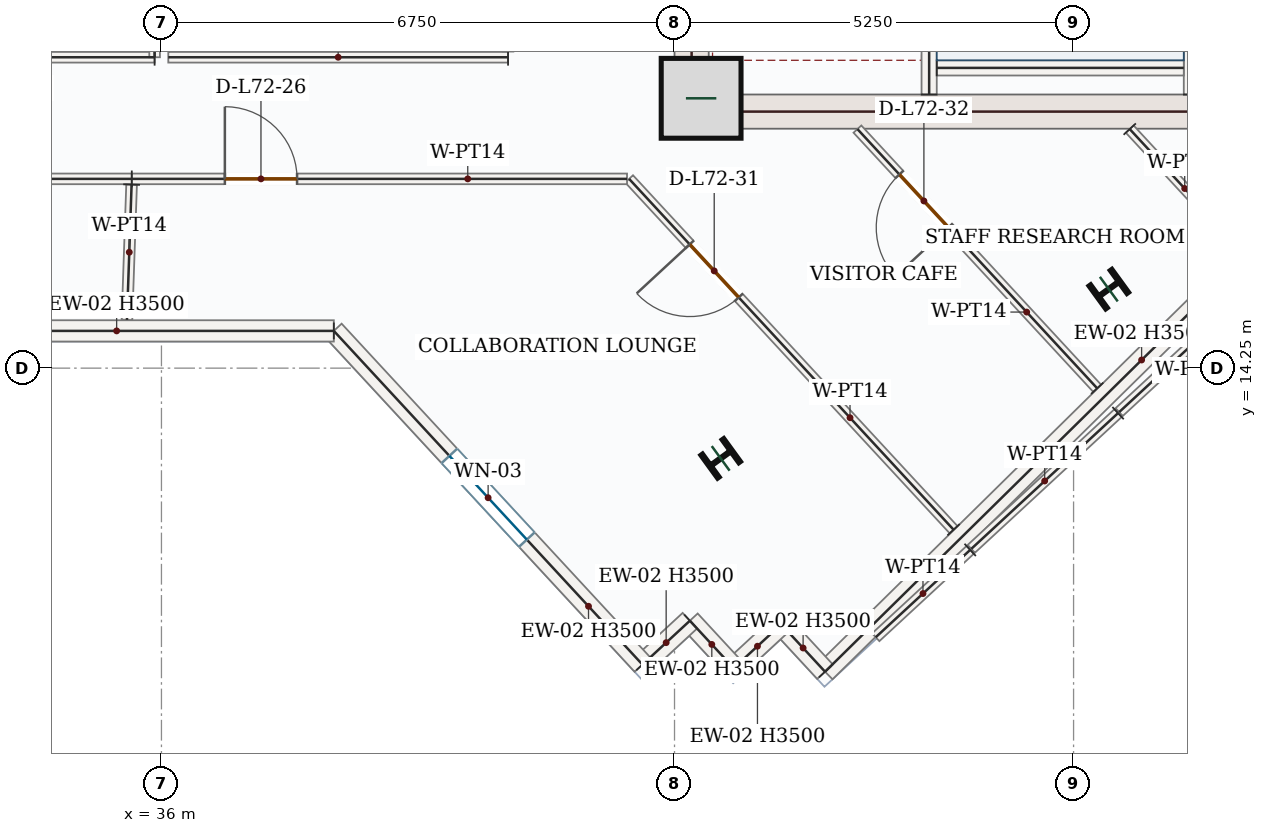
"""IFC4 building model, lengths in metres.
Left out: names, types, materials, properties, quantities, classifications, styles, units other than length and angle.
Written with IfcOpenShell. Run it as: python <this file> out.ifc"""

import sys

from ifc_helpers import new_model, si_unit, direction, frame, frame_2d, origin, origin_2d, place, context, subcontext, project, spatial, rectangle, i_section, extrude, source, transform, mapped, element, fill, save


model = new_model("IFC4")
c1 = context("Model", 3, precision=1e-05, world=origin(), true_north=direction((0.0, 1.0)))
c2 = subcontext(c1, "Body", "Model", "MODEL_VIEW")
j1 = project(units=[si_unit("LENGTHUNIT", "METRE"), si_unit("PLANEANGLEUNIT", "RADIAN")], contexts=[c1])
p1 = place(None, origin())
s1 = spatial("IfcSite", under=j1, at=p1, CompositionType="ELEMENT")
p2 = place(p1, origin())
s2 = spatial("IfcBuilding", under=s1, at=p2, CompositionType="ELEMENT")
p3 = place(p2, frame((0.0, 0.0, 299.1)))
s3 = spatial("IfcBuildingStorey", under=s2, at=p3, CompositionType="ELEMENT", Elevation=299.1)
p4 = place(p3, frame((42.975, 17.4, 0.0), z_axis=(0.0, 0.0, 1.0), x_axis=(0.0, 1.0, 0.0)))
e1 = element("IfcWall", 1, at=p4, inside=s3, PredefinedType="SHEAR", context=c2, shape_type="SweptSolid", body=[
    extrude(rectangle(XDim=8.55, YDim=0.45, at=frame_2d((4.275, 0.0))), origin(), (0.0, 0.0, 1.0), 3.5),
])
p5 = place(p4, frame((6.65, 0.0, 0.0)))
e2 = element("IfcOpeningElement", 2, at=p5, cuts=e1, PredefinedType="OPENING", context=c2, shape_type="SweptSolid", body=[
    extrude(rectangle(XDim=1.1, YDim=2.2, at=frame_2d((0.55, 1.1))), frame((0.0, 0.235, 0.0), z_axis=(0.0, -1.0, 0.0), x_axis=(1.0, 0.0, 0.0)), (0.0, 0.0, 1.0), 0.47),
])
p6 = place(p4, frame((1.75, 0.0, 0.0)))
e3 = element("IfcOpeningElement", 3, at=p6, cuts=e1, PredefinedType="OPENING", context=c2, shape_type="SweptSolid", body=[
    extrude(rectangle(XDim=1.3, YDim=2.2, at=frame_2d((0.65, 1.1))), frame((0.0, 0.235, 0.0), z_axis=(0.0, -1.0, 0.0), x_axis=(1.0, 0.0, 0.0)), (0.0, 0.0, 1.0), 0.47),
])
p7 = place(p4, frame((4.55, 0.0, 0.0)))
e4 = element("IfcOpeningElement", 4, at=p7, cuts=e1, PredefinedType="OPENING", context=c2, shape_type="SweptSolid", body=[
    extrude(rectangle(XDim=0.88, YDim=2.1, at=frame_2d((0.44, 1.05))), frame((0.0, 0.235, 0.0), z_axis=(0.0, -1.0, 0.0), x_axis=(1.0, 0.0, 0.0)), (0.0, 0.0, 1.0), 0.47),
])
m1 = source(origin(), c2, "Body", "SweptSolid", [
    extrude(rectangle(XDim=7.1, YDim=0.45, at=frame_2d((3.55, 0.0))), origin(), (0.0, 0.0, 1.0), 3.5),
])
p8 = place(p3, frame((43.2, 17.625, 0.0), z_axis=(0.0, 0.0, 1.0), x_axis=(1.0, 0.0, 0.0)))
e5 = element("IfcWall", 5, at=p8, inside=s3, PredefinedType="SHEAR", context=c2, shape_type="MappedRepresentation", body=[
    mapped(m1, transform((0.0, 0.0, 0.0), x_axis=(1.0, 0.0, 0.0), y_axis=(0.0, 1.0, 0.0), z_axis=(0.0, 0.0, 1.0), scale=1.0)),
])
m2 = source(origin(), c2, "Body", "SweptSolid", [
    extrude(rectangle(XDim=1.05, YDim=1.05, at=origin_2d()), origin(), (0.0, 0.0, 1.0), 3.75),
])
p9 = place(p3, frame((43.1, 17.8, 0.0), z_axis=(0.0, 0.0, 1.0), x_axis=(1.0, 0.0, 0.0)))
e6 = element("IfcColumn", 6, at=p9, inside=s3, PredefinedType="COLUMN", context=c2, shape_type="MappedRepresentation", body=[
    mapped(m2, transform((0.0, 0.0, 0.0), x_axis=(1.0, 0.0, 0.0), y_axis=(0.0, 1.0, 0.0), z_axis=(0.0, 0.0, 1.0), scale=1.0)),
])
m3 = source(origin(), c2, "Body", "SweptSolid", [
    extrude(i_section(OverallWidth=0.374, OverallDepth=0.372, WebThickness=0.016, FlangeThickness=0.026, FilletRadius=0.018, at=origin_2d()), origin(), (0.0, 0.0, 1.0), 3.75),
])
for number, where, z_axis, x_axis in (
    (7, (43.357, 13.063, 0.0), (0.0, 0.0, 1.0), (-0.588, 0.809, 0.0)),
    (8, (48.464, 15.289, 0.0), (0.0, 0.0, 1.0), (-0.588, 0.809, 0.0)),
):
    element("IfcColumn", number, at=place(p3, frame(where, z_axis=z_axis, x_axis=x_axis)), inside=s3, PredefinedType="COLUMN", context=c2, shape_type="MappedRepresentation", body=[
        mapped(m3, transform((0.0, 0.0, 0.0), x_axis=(1.0, 0.0, 0.0), y_axis=(0.0, 1.0, 0.0), z_axis=(0.0, 0.0, 1.0), scale=1.0)),
    ])
m4 = source(origin(), c2, "Body", "SweptSolid", [
    extrude(rectangle(XDim=11.69, YDim=0.28, at=frame_2d((5.845, 0.0))), origin(), (0.0, 0.0, 1.0), 3.5),
])
p10 = place(p3, frame((53.06, 18.458, 0.0), z_axis=(0.0, 0.0, 1.0), x_axis=(-0.712557502542, -0.701613715353, 0.0)))
e9 = element("IfcWall", 9, at=p10, inside=s3, PredefinedType="SOLIDWALL", context=c2, shape_type="MappedRepresentation", body=[
    mapped(m4, transform((0.0, 0.0, 0.0), x_axis=(1.0, 0.0, 0.0), y_axis=(0.0, 1.0, 0.0), z_axis=(0.0, 0.0, 1.0), scale=1.0)),
])
m5 = source(origin(), c2, "Body", "SweptSolid", [
    extrude(rectangle(XDim=0.85, YDim=0.28, at=frame_2d((0.425, 0.0))), origin(), (0.0, 0.0, 1.0), 3.5),
])
for number, where, z_axis, x_axis in (
    (10, (44.73, 10.256, 0.0), (0.0, 0.0, 1.0), (-0.679, 0.734, 0.0)),
    (11, (44.153, 10.88, 0.0), (0.0, 0.0, 1.0), (-0.734, -0.679, 0.0)),
    (12, (43.529, 10.303, 0.0), (0.0, 0.0, 1.0), (-0.679, 0.734, 0.0)),
):
    element("IfcWall", number, at=place(p3, frame(where, z_axis=z_axis, x_axis=x_axis)), inside=s3, PredefinedType="SOLIDWALL", context=c2, shape_type="MappedRepresentation", body=[
        mapped(m5, transform((0.0, 0.0, 0.0), x_axis=(1.0, 0.0, 0.0), y_axis=(0.0, 1.0, 0.0), z_axis=(0.0, 0.0, 1.0), scale=1.0)),
    ])
m6 = source(origin(), c2, "Body", "SweptSolid", [
    extrude(rectangle(XDim=0.85, YDim=0.28, at=frame_2d((0.425, 0.0))), origin(), (0.0, 0.0, 1.0), 3.5),
])
p11 = place(p3, frame((42.952, 10.927, 0.0), z_axis=(0.0, 0.0, 1.0), x_axis=(-0.73428557742, -0.678840696183, 0.0)))
e13 = element("IfcWall", 13, at=p11, inside=s3, PredefinedType="SOLIDWALL", context=c2, shape_type="MappedRepresentation", body=[
    mapped(m6, transform((0.0, 0.0, 0.0), x_axis=(1.0, 0.0, 0.0), y_axis=(0.0, 1.0, 0.0), z_axis=(0.0, 0.0, 1.0), scale=1.0)),
])
p12 = place(p3, frame((42.328, 10.35, 0.0), z_axis=(0.0, 0.0, 1.0), x_axis=(-0.679010627727, 0.734128440693, 0.0)))
e14 = element("IfcWall", 14, at=p12, inside=s3, PredefinedType="SOLIDWALL", context=c2, shape_type="SweptSolid", body=[
    extrude(rectangle(XDim=5.98, YDim=0.28, at=frame_2d((2.99, 0.0))), origin(), (0.0, 0.0, 1.0), 3.5),
])
p13 = place(p12, frame((2.24, 0.0, 0.85)))
e15 = element("IfcOpeningElement", 15, at=p13, cuts=e14, PredefinedType="OPENING", context=c2, shape_type="SweptSolid", body=[
    extrude(rectangle(XDim=1.5, YDim=1.5, at=frame_2d((0.75, 0.75))), frame((0.0, 0.15, 0.0), z_axis=(0.0, -1.0, 0.0), x_axis=(1.0, 0.0, 0.0)), (0.0, 0.0, 1.0), 0.3),
])
m7 = source(origin(), c2, "Body", "SweptSolid", [
    extrude(rectangle(XDim=5.714, YDim=0.28, at=frame_2d((2.857, 0.0))), origin(), (0.0, 0.0, 1.0), 3.5),
])
p14 = place(p3, frame((38.268, 14.74, 0.0), z_axis=(0.0, 0.0, 1.0), x_axis=(-1.0, 0.0, 0.0)))
e16 = element("IfcWall", 16, at=p14, inside=s3, PredefinedType="SOLIDWALL", context=c2, shape_type="MappedRepresentation", body=[
    mapped(m7, transform((0.0, 0.0, 0.0), x_axis=(1.0, 0.0, 0.0), y_axis=(0.0, 1.0, 0.0), z_axis=(0.0, 0.0, 1.0), scale=1.0)),
])
m8 = source(origin(), c2, "Body", "SweptSolid", [
    extrude(rectangle(XDim=7.87, YDim=0.2, at=frame_2d((3.935, 0.0))), origin(), (0.0, 0.0, 1.0), 3.5),
])
p15 = place(p3, frame((49.55, 17.85, 0.0), z_axis=(0.0, 0.0, 1.0), x_axis=(0.0, 1.0, 0.0)))
e17 = element("IfcWall", 17, at=p15, inside=s3, PredefinedType="SOLIDWALL", context=c2, shape_type="MappedRepresentation", body=[
    mapped(m8, transform((0.0, 0.0, 0.0), x_axis=(1.0, 0.0, 0.0), y_axis=(0.0, 1.0, 0.0), z_axis=(0.0, 0.0, 1.0), scale=1.0)),
])
p16 = place(p3, frame((46.1, 17.85, 0.0), z_axis=(0.0, 0.0, 1.0), x_axis=(0.0, 1.0, 0.0)))
e18 = element("IfcWall", 18, at=p16, inside=s3, PredefinedType="SOLIDWALL", context=c2, shape_type="SweptSolid", body=[
    extrude(rectangle(XDim=8.0, YDim=0.2, at=frame_2d((4.0, 0.0))), origin(), (0.0, 0.0, 1.0), 3.5),
])
p17 = place(p16, frame((6.3, 0.0, 0.0)))
e19 = element("IfcOpeningElement", 19, at=p17, cuts=e18, PredefinedType="OPENING", context=c2, shape_type="SweptSolid", body=[
    extrude(rectangle(XDim=1.05, YDim=2.15, at=frame_2d((0.525, 1.075))), frame((0.0, 0.11, 0.0), z_axis=(0.0, -1.0, 0.0), x_axis=(1.0, 0.0, 0.0)), (0.0, 0.0, 1.0), 0.22),
])
m9 = source(origin(), c2, "Body", "SweptSolid", [
    extrude(rectangle(XDim=3.25, YDim=0.2, at=frame_2d((1.625, 0.0))), origin(), (0.0, 0.0, 1.0), 3.5),
])
p18 = place(p3, frame((46.2, 18.2, 0.0), z_axis=(0.0, 0.0, 1.0), x_axis=(1.0, 0.0, 0.0)))
e20 = element("IfcWall", 20, at=p18, inside=s3, PredefinedType="SOLIDWALL", context=c2, shape_type="MappedRepresentation", body=[
    mapped(m9, transform((0.0, 0.0, 0.0), x_axis=(1.0, 0.0, 0.0), y_axis=(0.0, 1.0, 0.0), z_axis=(0.0, 0.0, 1.0), scale=1.0)),
])
p19 = place(p3, frame((48.311, 13.985, 0.0), z_axis=(0.0, 0.0, 1.0), x_axis=(-0.679002327249, 0.73413611789, 0.0)))
e21 = element("IfcWall", 21, at=p19, inside=s3, PredefinedType="PARTITIONING", context=c2, shape_type="SweptSolid", body=[
    extrude(rectangle(XDim=4.645, YDim=0.14, at=frame_2d((2.323, 0.0))), origin(), (0.0, 0.0, 1.0), 3.5),
])
p20 = place(p19, frame((2.882, 0.0, 0.0)))
e22 = element("IfcOpeningElement", 22, at=p20, cuts=e21, PredefinedType="OPENING", context=c2, shape_type="SweptSolid", body=[
    extrude(rectangle(XDim=0.95, YDim=2.15, at=frame_2d((0.475, 1.075))), frame((0.0, 0.08, 0.0), z_axis=(0.0, -1.0, 0.0), x_axis=(1.0, 0.0, 0.0)), (0.0, 0.0, 1.0), 0.16),
])
m10 = source(origin(), c2, "Body", "SweptSolid", [
    extrude(rectangle(XDim=2.13, YDim=0.14, at=frame_2d((1.065, 0.0))), origin(), (0.0, 0.0, 1.0), 3.5),
])
p21 = place(p3, frame((48.739, 17.395, 0.0), z_axis=(0.0, 0.0, 1.0), x_axis=(0.678946242809, -0.734187986401, 0.0)))
e23 = element("IfcWall", 23, at=p21, inside=s3, PredefinedType="PARTITIONING", context=c2, shape_type="MappedRepresentation", body=[
    mapped(m10, transform((0.0, 0.0, 0.0), x_axis=(1.0, 0.0, 0.0), y_axis=(0.0, 1.0, 0.0), z_axis=(0.0, 0.0, 1.0), scale=1.0)),
])
m11 = source(origin(), c2, "Body", "SweptSolid", [
    extrude(rectangle(XDim=2.63, YDim=0.14, at=frame_2d((1.315, 0.0))), origin(), (0.0, 0.0, 1.0), 3.5),
])
for number, where, z_axis, x_axis in (
    (24, (50.531, 15.458, 0.0), (0.0, 0.0, 1.0), (-0.734, -0.679, 0.0)),
    (25, (48.585, 13.658, 0.0), (0.0, 0.0, 1.0), (-0.734, -0.679, 0.0)),
):
    element("IfcWall", number, at=place(p3, frame(where, z_axis=z_axis, x_axis=x_axis)), inside=s3, PredefinedType="PARTITIONING", context=c2, shape_type="MappedRepresentation", body=[
        mapped(m11, transform((0.0, 0.0, 0.0), x_axis=(1.0, 0.0, 0.0), y_axis=(0.0, 1.0, 0.0), z_axis=(0.0, 0.0, 1.0), scale=1.0)),
    ])
p22 = place(p3, frame((46.421, 12.125, 0.0), z_axis=(0.0, 0.0, 1.0), x_axis=(-0.679016867794, 0.734122669076, 0.0)))
e26 = element("IfcWall", 26, at=p22, inside=s3, PredefinedType="PARTITIONING", context=c2, shape_type="SweptSolid", body=[
    extrude(rectangle(XDim=6.287, YDim=0.14, at=frame_2d((3.143, 0.0))), origin(), (0.0, 0.0, 1.0), 3.5),
])
p23 = place(p22, frame((4.163, 0.0, 0.0)))
e27 = element("IfcOpeningElement", 27, at=p23, cuts=e26, PredefinedType="OPENING", context=c2, shape_type="SweptSolid", body=[
    extrude(rectangle(XDim=0.95, YDim=2.15, at=frame_2d((0.475, 1.075))), frame((0.0, 0.08, 0.0), z_axis=(0.0, -1.0, 0.0), x_axis=(1.0, 0.0, 0.0)), (0.0, 0.0, 1.0), 0.16),
])
m12 = source(origin(), c2, "Body", "SweptSolid", [
    extrude(rectangle(XDim=4.47, YDim=0.14, at=frame_2d((2.235, 0.0))), origin(), (0.0, 0.0, 1.0), 3.5),
])
p24 = place(p3, frame((35.91, 18.34, 0.0), z_axis=(0.0, 0.0, 1.0), x_axis=(-1.0, 0.0, 0.0)))
e28 = element("IfcWall", 28, at=p24, inside=s3, PredefinedType="PARTITIONING", context=c2, shape_type="MappedRepresentation", body=[
    mapped(m12, transform((0.0, 0.0, 0.0), x_axis=(1.0, 0.0, 0.0), y_axis=(0.0, 1.0, 0.0), z_axis=(0.0, 0.0, 1.0), scale=1.0)),
])
m13 = source(origin(), c2, "Body", "SweptSolid", [
    extrude(rectangle(XDim=7.47, YDim=0.14, at=frame_2d((3.735, 0.0))), origin(), (0.0, 0.0, 1.0), 3.5),
])
p25 = place(p3, frame((35.91, 25.81, 0.0), z_axis=(0.0, 0.0, 1.0), x_axis=(0.0, -1.0, 0.0)))
e29 = element("IfcWall", 29, at=p25, inside=s3, PredefinedType="PARTITIONING", context=c2, shape_type="MappedRepresentation", body=[
    mapped(m13, transform((0.0, 0.0, 0.0), x_axis=(1.0, 0.0, 0.0), y_axis=(0.0, 1.0, 0.0), z_axis=(0.0, 0.0, 1.0), scale=1.0)),
])
p26 = place(p3, frame((40.56, 18.34, 0.0), z_axis=(0.0, 0.0, 1.0), x_axis=(-1.0, 0.0, 0.0)))
e30 = element("IfcWall", 30, at=p26, inside=s3, PredefinedType="PARTITIONING", context=c2, shape_type="MappedRepresentation", body=[
    mapped(m12, transform((0.0, 0.0, 0.0), x_axis=(1.0, 0.0, 0.0), y_axis=(0.0, 1.0, 0.0), z_axis=(0.0, 0.0, 1.0), scale=1.0)),
])
p27 = place(p3, frame((29.256, 16.74, 0.0), z_axis=(0.0, 0.0, 1.0), x_axis=(1.0, 0.0, 0.0)))
e31 = element("IfcWall", 31, at=p27, inside=s3, PredefinedType="PARTITIONING", context=c2, shape_type="SweptSolid", body=[
    extrude(rectangle(XDim=6.354, YDim=0.14, at=frame_2d((3.177, 0.0))), origin(), (0.0, 0.0, 1.0), 3.5),
])
p28 = place(p27, frame((4.215, 0.0, 0.0)))
e32 = element("IfcOpeningElement", 32, at=p28, cuts=e31, PredefinedType="OPENING", context=c2, shape_type="SweptSolid", body=[
    extrude(rectangle(XDim=0.95, YDim=2.15, at=frame_2d((0.475, 1.075))), frame((0.0, 0.08, 0.0), z_axis=(0.0, -1.0, 0.0), x_axis=(1.0, 0.0, 0.0)), (0.0, 0.0, 1.0), 0.16),
])
m14 = source(origin(), c2, "Body", "SweptSolid", [
    extrude(rectangle(XDim=1.781, YDim=0.14, at=frame_2d((0.891, 0.0))), origin(), (0.0, 0.0, 1.0), 3.5),
])
p29 = place(p3, frame((35.607, 16.665, 0.0), z_axis=(0.0, 0.0, 1.0), x_axis=(-0.034268709891, -0.999412655274, 0.0)))
e33 = element("IfcWall", 33, at=p29, inside=s3, PredefinedType="PARTITIONING", context=c2, shape_type="MappedRepresentation", body=[
    mapped(m14, transform((0.0, 0.0, 0.0), x_axis=(1.0, 0.0, 0.0), y_axis=(0.0, 1.0, 0.0), z_axis=(0.0, 0.0, 1.0), scale=1.0)),
])
p30 = place(p3, frame((35.61, 16.74, 0.0), z_axis=(0.0, 0.0, 1.0), x_axis=(1.0, 0.0, 0.0)))
e34 = element("IfcWall", 34, at=p30, inside=s3, PredefinedType="PARTITIONING", context=c2, shape_type="SweptSolid", body=[
    extrude(rectangle(XDim=6.515, YDim=0.14, at=frame_2d((3.258, 0.0))), origin(), (0.0, 0.0, 1.0), 3.5),
])
p31 = place(p30, frame((1.224, 0.0, 0.0)))
e35 = element("IfcOpeningElement", 35, at=p31, cuts=e34, PredefinedType="OPENING", context=c2, shape_type="SweptSolid", body=[
    extrude(rectangle(XDim=0.95, YDim=2.15, at=frame_2d((0.475, 1.075))), frame((0.0, 0.08, 0.0), z_axis=(0.0, -1.0, 0.0), x_axis=(1.0, 0.0, 0.0)), (0.0, 0.0, 1.0), 0.16),
])
m15 = source(origin(), c2, "Body", "SweptSolid", [
    extrude(rectangle(XDim=1.692, YDim=0.14, at=frame_2d((0.846, 0.0))), origin(), (0.0, 0.0, 1.0), 3.5),
])
p32 = place(p3, frame((46.64, 11.859, 0.0), z_axis=(0.0, 0.0, 1.0), x_axis=(-0.734194722112, -0.678938958982, 0.0)))
e36 = element("IfcWall", 36, at=p32, inside=s3, PredefinedType="PARTITIONING", context=c2, shape_type="MappedRepresentation", body=[
    mapped(m15, transform((0.0, 0.0, 0.0), x_axis=(1.0, 0.0, 0.0), y_axis=(0.0, 1.0, 0.0), z_axis=(0.0, 0.0, 1.0), scale=1.0)),
])
m16 = source(origin(), c2, "Body", "SweptSolid", [
    extrude(rectangle(XDim=1.5, YDim=1.5, at=frame_2d((0.75, 0.75))), frame((0.0, 0.03, 0.0), z_axis=(0.0, -1.0, 0.0), x_axis=(1.0, 0.0, 0.0)), (0.0, 0.0, 1.0), 0.06),
])
p33 = place(p13, origin())
e37 = element("IfcWindow", 37, at=p33, inside=s3, PartitioningType="SINGLE_PANEL", PredefinedType="WINDOW", context=c2, shape_type="MappedRepresentation", body=[
    mapped(m16, transform((0.0, 0.0, 0.0), x_axis=(1.0, 0.0, 0.0), y_axis=(0.0, 1.0, 0.0), z_axis=(0.0, 0.0, 1.0), scale=1.0)),
])
fill(e15, e37)
m17 = source(origin(), c2, "Body", "SweptSolid", [
    extrude(rectangle(XDim=0.95, YDim=2.15, at=frame_2d((0.475, 1.075))), frame((0.0, 0.025, 0.0), z_axis=(0.0, -1.0, 0.0), x_axis=(1.0, 0.0, 0.0)), (0.0, 0.0, 1.0), 0.05),
])
p34 = place(p31, origin())
e38 = element("IfcDoor", 38, at=p34, inside=s3, OperationType="SINGLE_SWING_LEFT", PredefinedType="DOOR", context=c2, shape_type="MappedRepresentation", body=[
    mapped(m17, transform((0.0, 0.0, 0.0), x_axis=(1.0, 0.0, 0.0), y_axis=(0.0, 1.0, 0.0), z_axis=(0.0, 0.0, 1.0), scale=1.0)),
])
fill(e35, e38)
p35 = place(p23, origin())
e39 = element("IfcDoor", 39, at=p35, inside=s3, OperationType="SINGLE_SWING_RIGHT", PredefinedType="DOOR", context=c2, shape_type="MappedRepresentation", body=[
    mapped(m17, transform((0.0, 0.0, 0.0), x_axis=(1.0, 0.0, 0.0), y_axis=(0.0, 1.0, 0.0), z_axis=(0.0, 0.0, 1.0), scale=1.0)),
])
fill(e27, e39)
p36 = place(p20, origin())
e40 = element("IfcDoor", 40, at=p36, inside=s3, OperationType="SINGLE_SWING_LEFT", PredefinedType="DOOR", context=c2, shape_type="MappedRepresentation", body=[
    mapped(m17, transform((0.0, 0.0, 0.0), x_axis=(1.0, 0.0, 0.0), y_axis=(0.0, 1.0, 0.0), z_axis=(0.0, 0.0, 1.0), scale=1.0)),
])
fill(e22, e40)
save(model, sys.argv[1])
